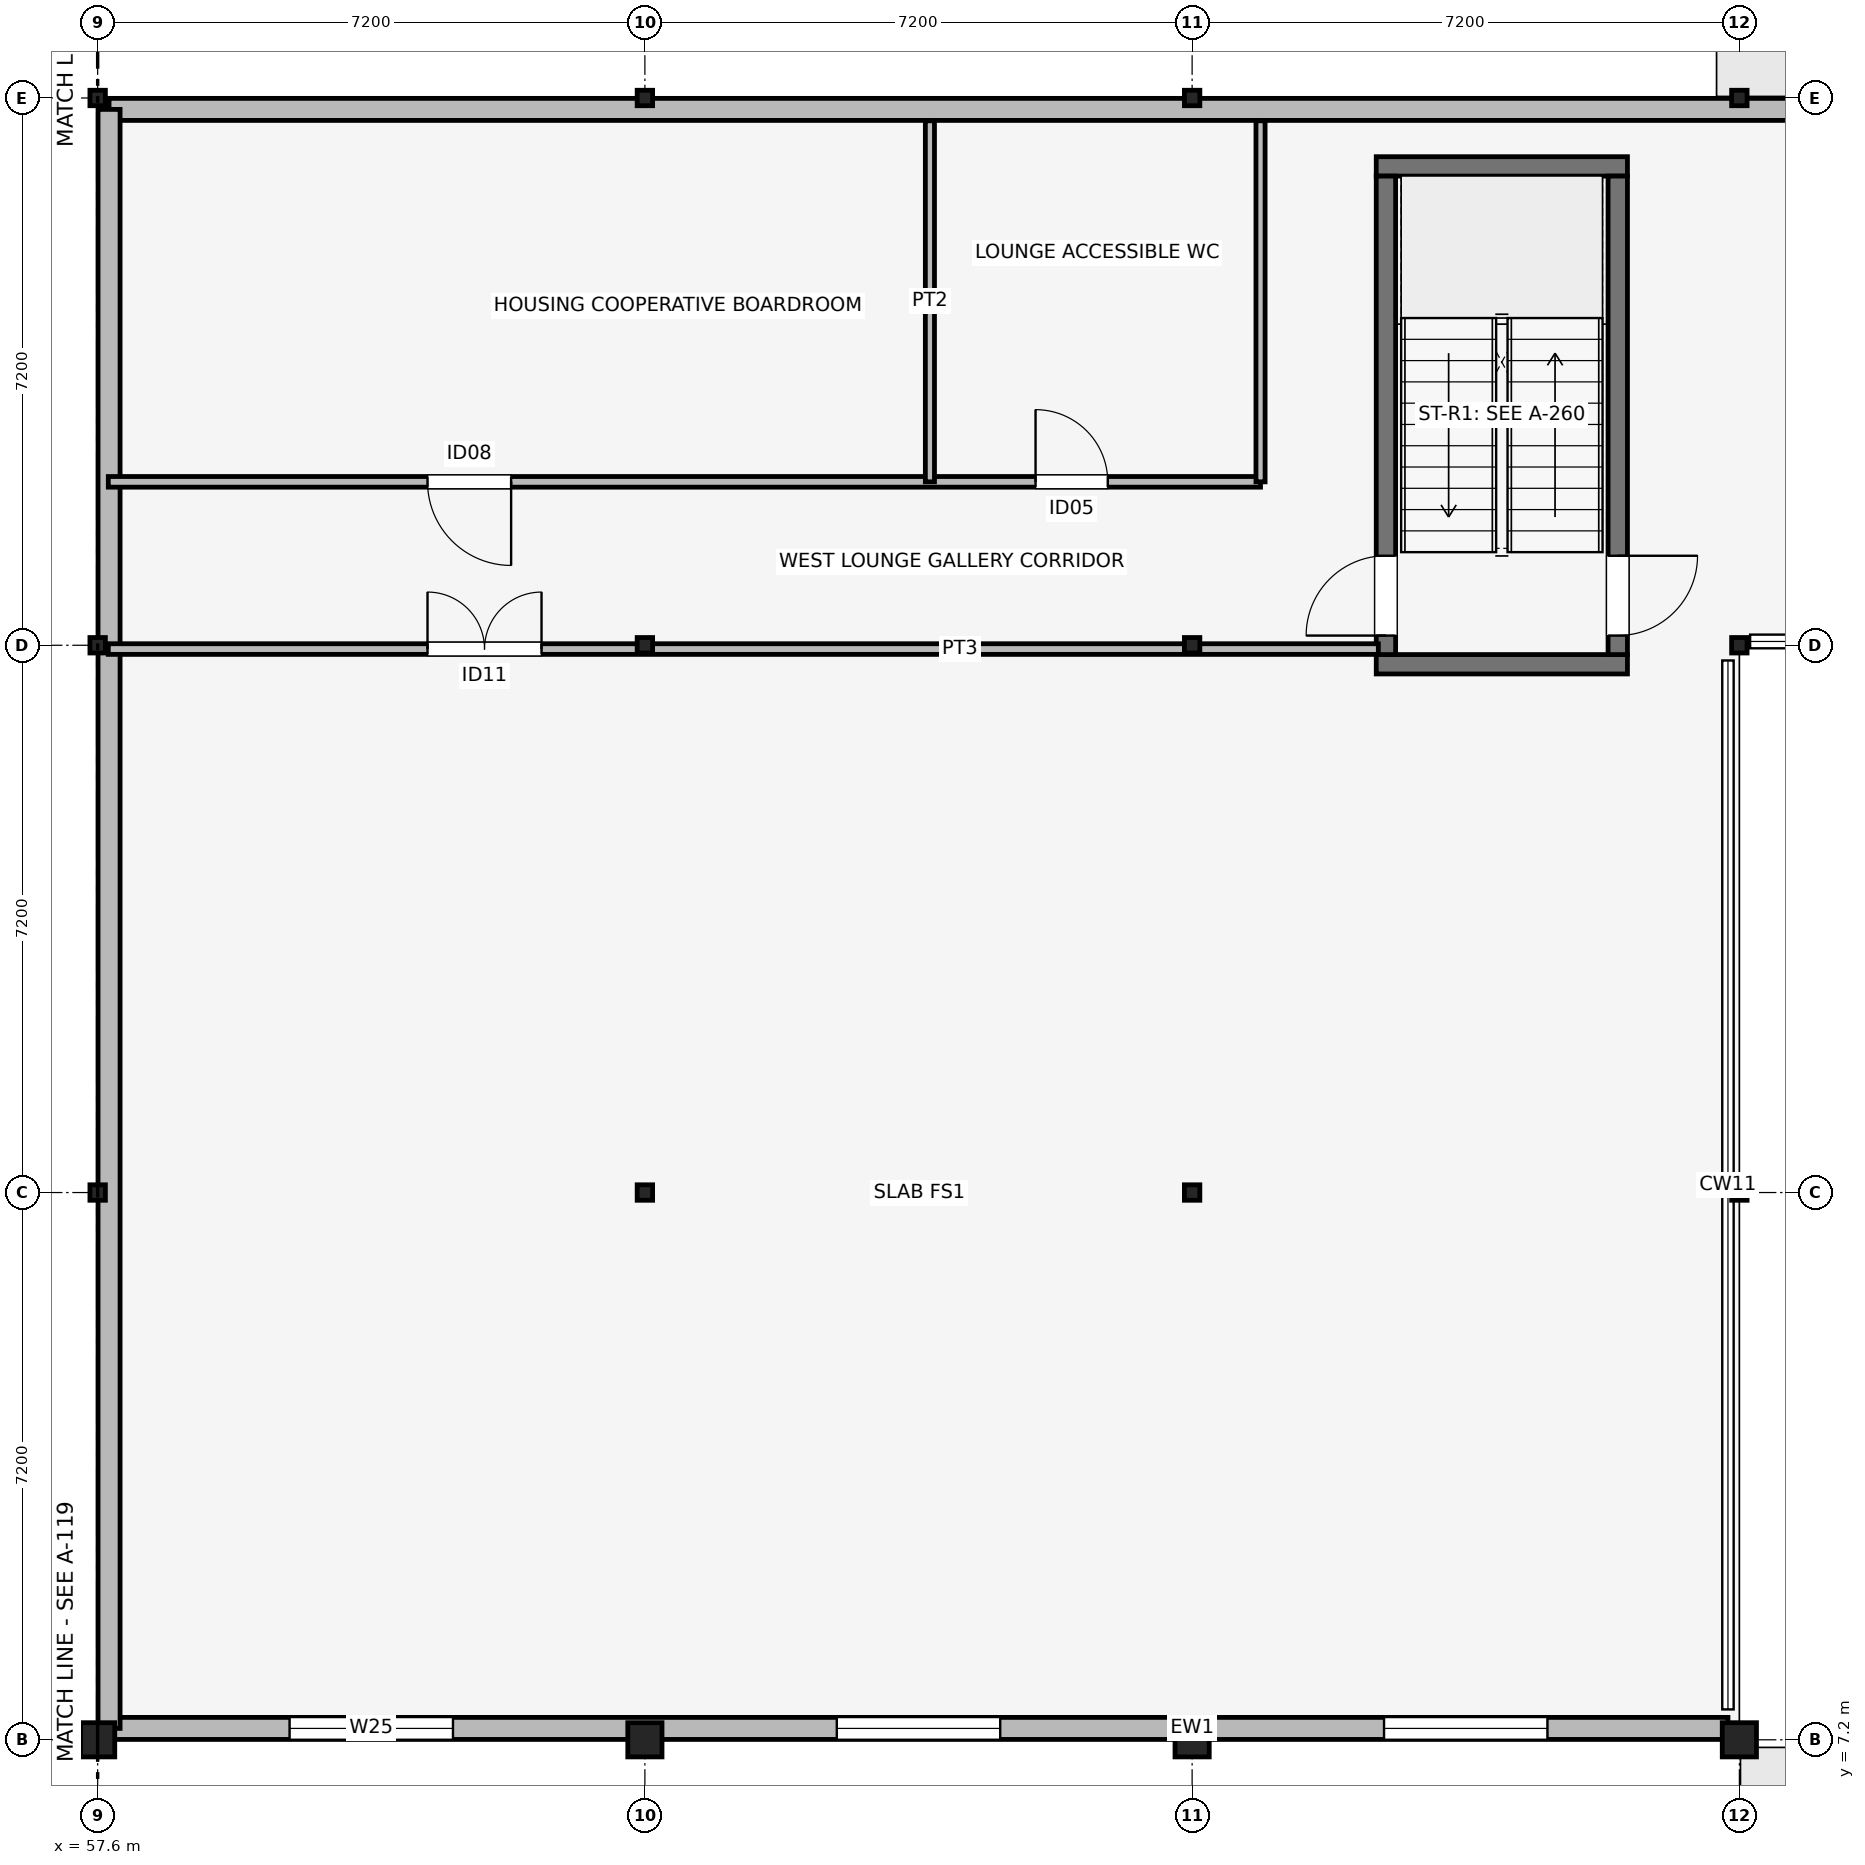
"""IFC4 building model, lengths in metres.
Left out: names, types, materials, properties, quantities, classifications, styles, units other than length and angle.
Written with IfcOpenShell. Run it as: python <this file> out.ifc"""

import sys

from ifc_helpers import new_model, si_unit, direction, frame, frame_2d, origin, origin_2d, place, context, subcontext, project, spatial, rectangle, circle, i_section, extrude, element, fill, save


model = new_model("IFC4")
c1 = context("Model", 3, precision=1e-05, world=origin(), true_north=direction((0.0, 1.0)))
c2 = subcontext(c1, "Body", "Model", "MODEL_VIEW")
j1 = project(units=[si_unit("LENGTHUNIT", "METRE"), si_unit("PLANEANGLEUNIT", "RADIAN")], contexts=[c1])
p1 = place(None, origin())
s1 = spatial("IfcSite", under=j1, at=p1, CompositionType="ELEMENT")
p2 = place(p1, origin())
s2 = spatial("IfcBuilding", under=s1, at=p2, CompositionType="ELEMENT")
p3 = place(p2, frame((0.0, 0.0, 4.5)))
s3 = spatial("IfcBuildingStorey", under=s2, at=p3, CompositionType="ELEMENT", Elevation=4.5)
p4 = place(p3, frame((57.6, 7.2, 0.0), z_axis=(0.0, 0.0, 1.0), x_axis=(1.0, 0.0, 0.0)))
e1 = element("IfcColumn", 1, at=p4, inside=s3, PredefinedType="COLUMN", context=c2, shape_type="SweptSolid", body=[
    extrude(circle(Radius=0.225, at=origin_2d()), origin(), (0.0, 0.0, 1.0), 4.2),
])
for number, where, z_axis, x_axis in (
    (2, (57.6, 14.4, 0.0), (0.0, 0.0, 1.0), (1.0, 0.0, 0.0)),
    (3, (57.6, 21.6, 0.0), (0.0, 0.0, 1.0), (1.0, 0.0, 0.0)),
    (4, (57.6, 28.8, 0.0), (0.0, 0.0, 1.0), (1.0, 0.0, 0.0)),
):
    element("IfcColumn", number, at=place(p3, frame(where, z_axis=z_axis, x_axis=x_axis)), inside=s3, PredefinedType="COLUMN", context=c2, shape_type="SweptSolid", body=[
        extrude(i_section(OverallWidth=0.203, OverallDepth=0.203, WebThickness=0.007, FlangeThickness=0.011, FilletRadius=0.01, at=origin_2d()), origin(), (0.0, 0.0, 1.0), 4.2),
    ])
p5 = place(p3, frame((64.8, 7.2, 0.0), z_axis=(0.0, 0.0, 1.0), x_axis=(1.0, 0.0, 0.0)))
e5 = element("IfcColumn", 5, at=p5, inside=s3, PredefinedType="COLUMN", context=c2, shape_type="SweptSolid", body=[
    extrude(circle(Radius=0.225, at=origin_2d()), origin(), (0.0, 0.0, 1.0), 4.2),
])
for number, where, z_axis, x_axis in (
    (6, (64.8, 14.4, 0.0), (0.0, 0.0, 1.0), (1.0, 0.0, 0.0)),
    (7, (64.8, 21.6, 0.0), (0.0, 0.0, 1.0), (1.0, 0.0, 0.0)),
    (8, (64.8, 28.8, 0.0), (0.0, 0.0, 1.0), (1.0, 0.0, 0.0)),
):
    element("IfcColumn", number, at=place(p3, frame(where, z_axis=z_axis, x_axis=x_axis)), inside=s3, PredefinedType="COLUMN", context=c2, shape_type="SweptSolid", body=[
        extrude(i_section(OverallWidth=0.203, OverallDepth=0.203, WebThickness=0.007, FlangeThickness=0.011, FilletRadius=0.01, at=origin_2d()), origin(), (0.0, 0.0, 1.0), 4.2),
    ])
p6 = place(p3, frame((72.0, 7.2, 0.0), z_axis=(0.0, 0.0, 1.0), x_axis=(1.0, 0.0, 0.0)))
e9 = element("IfcColumn", 9, at=p6, inside=s3, PredefinedType="COLUMN", context=c2, shape_type="SweptSolid", body=[
    extrude(circle(Radius=0.225, at=origin_2d()), origin(), (0.0, 0.0, 1.0), 4.2),
])
for number, where, z_axis, x_axis in (
    (10, (72.0, 14.4, 0.0), (0.0, 0.0, 1.0), (1.0, 0.0, 0.0)),
    (11, (72.0, 21.6, 0.0), (0.0, 0.0, 1.0), (1.0, 0.0, 0.0)),
    (12, (72.0, 28.8, 0.0), (0.0, 0.0, 1.0), (1.0, 0.0, 0.0)),
):
    element("IfcColumn", number, at=place(p3, frame(where, z_axis=z_axis, x_axis=x_axis)), inside=s3, PredefinedType="COLUMN", context=c2, shape_type="SweptSolid", body=[
        extrude(i_section(OverallWidth=0.203, OverallDepth=0.203, WebThickness=0.007, FlangeThickness=0.011, FilletRadius=0.01, at=origin_2d()), origin(), (0.0, 0.0, 1.0), 4.2),
    ])
p7 = place(p3, frame((79.2, 7.2, 0.0), z_axis=(0.0, 0.0, 1.0), x_axis=(1.0, 0.0, 0.0)))
e13 = element("IfcColumn", 13, at=p7, inside=s3, PredefinedType="COLUMN", context=c2, shape_type="SweptSolid", body=[
    extrude(circle(Radius=0.225, at=origin_2d()), origin(), (0.0, 0.0, 1.0), 4.2),
])
for number, where, z_axis, x_axis in (
    (14, (79.2, 14.4, 0.0), (0.0, 0.0, 1.0), (1.0, 0.0, 0.0)),
    (15, (79.2, 21.6, 0.0), (0.0, 0.0, 1.0), (1.0, 0.0, 0.0)),
    (16, (79.2, 28.8, 0.0), (0.0, 0.0, 1.0), (1.0, 0.0, 0.0)),
):
    element("IfcColumn", number, at=place(p3, frame(where, z_axis=z_axis, x_axis=x_axis)), inside=s3, PredefinedType="COLUMN", context=c2, shape_type="SweptSolid", body=[
        extrude(i_section(OverallWidth=0.203, OverallDepth=0.203, WebThickness=0.007, FlangeThickness=0.011, FilletRadius=0.01, at=origin_2d()), origin(), (0.0, 0.0, 1.0), 4.2),
    ])
for number, where, z_axis, x_axis in (
    (17, (74.423, 21.35, 0.0), (0.0, 0.0, 1.0), (1.0, 0.0, 0.0)),
    (18, (74.423, 27.9, 0.0), (0.0, 0.0, 1.0), (1.0, 0.0, 0.0)),
):
    element("IfcWall", number, at=place(p3, frame(where, z_axis=z_axis, x_axis=x_axis)), inside=s3, PredefinedType="SHEAR", context=c2, shape_type="SweptSolid", body=[
        extrude(rectangle(XDim=3.305, YDim=0.255, at=frame_2d((1.652, 0.0))), origin(), (0.0, 0.0, 1.0), 4.2),
    ])
p8 = place(p3, frame((74.55, 21.478, 0.0), z_axis=(0.0, 0.0, 1.0), x_axis=(0.0, 1.0, 0.0)))
e19 = element("IfcWall", 19, at=p8, inside=s3, PredefinedType="SHEAR", context=c2, shape_type="SweptSolid", body=[
    extrude(rectangle(XDim=6.295, YDim=0.255, at=frame_2d((3.147, 0.0))), origin(), (0.0, 0.0, 1.0), 4.2),
])
p9 = place(p8, frame((0.25, 0.0, 0.0)))
e20 = element("IfcOpeningElement", 20, at=p9, cuts=e19, PredefinedType="OPENING", context=c2, shape_type="SweptSolid", body=[
    extrude(rectangle(XDim=1.05, YDim=2.12, at=frame_2d((0.525, 1.06))), frame((0.0, 0.137, 0.0), z_axis=(0.0, -1.0, 0.0), x_axis=(1.0, 0.0, 0.0)), (0.0, 0.0, 1.0), 0.275),
])
p10 = place(p3, frame((77.6, 21.478, 0.0), z_axis=(0.0, 0.0, 1.0), x_axis=(0.0, 1.0, 0.0)))
e21 = element("IfcWall", 21, at=p10, inside=s3, PredefinedType="SHEAR", context=c2, shape_type="SweptSolid", body=[
    extrude(rectangle(XDim=6.295, YDim=0.255, at=frame_2d((3.147, 0.0))), origin(), (0.0, 0.0, 1.0), 4.2),
])
p11 = place(p10, frame((1.3, 0.0, 0.0), z_axis=(0.0, 0.0, 1.0), x_axis=(-1.0, 0.0, 0.0)))
e22 = element("IfcOpeningElement", 22, at=p11, cuts=e21, PredefinedType="OPENING", context=c2, shape_type="SweptSolid", body=[
    extrude(rectangle(XDim=1.05, YDim=2.12, at=frame_2d((0.525, 1.06))), frame((0.0, 0.137, 0.0), z_axis=(0.0, -1.0, 0.0), x_axis=(1.0, 0.0, 0.0)), (0.0, 0.0, 1.0), 0.275),
])
p12 = place(p3, frame((57.75, 7.35, 0.0), z_axis=(0.0, 0.0, 1.0), x_axis=(1.0, 0.0, 0.0)))
e23 = element("IfcWall", 23, at=p12, inside=s3, PredefinedType="SOLIDWALL", context=c2, shape_type="SweptSolid", body=[
    extrude(rectangle(XDim=21.3, YDim=0.29, at=frame_2d((10.65, 0.0))), origin(), (0.0, 0.0, 1.0), 2.74),
])
p13 = place(p12, frame((2.375, 0.0, 0.48)))
e24 = element("IfcOpeningElement", 24, at=p13, cuts=e23, PredefinedType="OPENING", context=c2, shape_type="SweptSolid", body=[
    extrude(rectangle(XDim=2.15, YDim=2.15, at=frame_2d((1.075, 1.075))), frame((0.0, 0.155, 0.0), z_axis=(0.0, -1.0, 0.0), x_axis=(1.0, 0.0, 0.0)), (0.0, 0.0, 1.0), 0.31),
])
p14 = place(p12, frame((9.575, 0.0, 0.48)))
e25 = element("IfcOpeningElement", 25, at=p14, cuts=e23, PredefinedType="OPENING", context=c2, shape_type="SweptSolid", body=[
    extrude(rectangle(XDim=2.15, YDim=2.15, at=frame_2d((1.075, 1.075))), frame((0.0, 0.155, 0.0), z_axis=(0.0, -1.0, 0.0), x_axis=(1.0, 0.0, 0.0)), (0.0, 0.0, 1.0), 0.31),
])
p15 = place(p12, frame((16.775, 0.0, 0.48)))
e26 = element("IfcOpeningElement", 26, at=p15, cuts=e23, PredefinedType="OPENING", context=c2, shape_type="SweptSolid", body=[
    extrude(rectangle(XDim=2.15, YDim=2.15, at=frame_2d((1.075, 1.075))), frame((0.0, 0.155, 0.0), z_axis=(0.0, -1.0, 0.0), x_axis=(1.0, 0.0, 0.0)), (0.0, 0.0, 1.0), 0.31),
])
p16 = place(p3, frame((57.75, 28.65, 0.0), z_axis=(0.0, 0.0, 1.0), x_axis=(1.0, 0.0, 0.0)))
e27 = element("IfcWall", 27, at=p16, inside=s3, PredefinedType="SOLIDWALL", context=c2, shape_type="SweptSolid", body=[
    extrude(rectangle(XDim=50.1, YDim=0.29, at=frame_2d((25.05, 0.0))), origin(), (0.0, 0.0, 1.0), 3.253),
])
p17 = place(p3, frame((57.75, 7.35, 0.0), z_axis=(0.0, 0.0, 1.0), x_axis=(0.0, 1.0, 0.0)))
e28 = element("IfcWall", 28, at=p17, inside=s3, PredefinedType="SOLIDWALL", context=c2, shape_type="SweptSolid", body=[
    extrude(rectangle(XDim=21.3, YDim=0.29, at=frame_2d((10.65, 0.0))), origin(), (0.0, 0.0, 1.0), 2.74),
])
p18 = place(p3, frame((57.74, 21.55, 0.0), z_axis=(0.0, 0.0, 1.0), x_axis=(1.0, 0.0, 0.0)))
e29 = element("IfcWall", 29, at=p18, inside=s3, PredefinedType="PARTITIONING", context=c2, shape_type="SweptSolid", body=[
    extrude(rectangle(XDim=16.71, YDim=0.14, at=frame_2d((8.355, 0.0))), origin(), (0.0, 0.0, 1.0), 3.2),
])
p19 = place(p18, frame((4.2, 0.0, 0.0)))
e30 = element("IfcOpeningElement", 30, at=p19, cuts=e29, PredefinedType="OPENING", context=c2, shape_type="SweptSolid", body=[
    extrude(rectangle(XDim=1.5, YDim=2.28, at=frame_2d((0.75, 1.14))), frame((0.0, 0.08, 0.0), z_axis=(0.0, -1.0, 0.0), x_axis=(1.0, 0.0, 0.0)), (0.0, 0.0, 1.0), 0.16),
])
p20 = place(p3, frame((57.74, 23.75, 0.0), z_axis=(0.0, 0.0, 1.0), x_axis=(1.0, 0.0, 0.0)))
e31 = element("IfcWall", 31, at=p20, inside=s3, PredefinedType="PARTITIONING", context=c2, shape_type="SweptSolid", body=[
    extrude(rectangle(XDim=15.16, YDim=0.14, at=frame_2d((7.58, 0.0))), origin(), (0.0, 0.0, 1.0), 3.2),
])
p21 = place(p20, frame((5.3, 0.0, 0.0), z_axis=(0.0, 0.0, 1.0), x_axis=(-1.0, 0.0, 0.0)))
e32 = element("IfcOpeningElement", 32, at=p21, cuts=e31, PredefinedType="OPENING", context=c2, shape_type="SweptSolid", body=[
    extrude(rectangle(XDim=1.1, YDim=2.15, at=frame_2d((0.55, 1.075))), frame((0.0, 0.08, 0.0), z_axis=(0.0, -1.0, 0.0), x_axis=(1.0, 0.0, 0.0)), (0.0, 0.0, 1.0), 0.16),
])
p22 = place(p20, frame((12.2, 0.0, 0.0)))
e33 = element("IfcOpeningElement", 33, at=p22, cuts=e31, PredefinedType="OPENING", context=c2, shape_type="SweptSolid", body=[
    extrude(rectangle(XDim=0.95, YDim=2.12, at=frame_2d((0.475, 1.06))), frame((0.0, 0.08, 0.0), z_axis=(0.0, -1.0, 0.0), x_axis=(1.0, 0.0, 0.0)), (0.0, 0.0, 1.0), 0.16),
])
for number, where, z_axis, x_axis in (
    (34, (68.55, 23.75, 0.0), (0.0, 0.0, 1.0), (0.0, 1.0, 0.0)),
    (35, (72.9, 23.75, 0.0), (0.0, 0.0, 1.0), (0.0, 1.0, 0.0)),
):
    element("IfcWall", number, at=place(p3, frame(where, z_axis=z_axis, x_axis=x_axis)), inside=s3, PredefinedType="PARTITIONING", context=c2, shape_type="SweptSolid", body=[
        extrude(rectangle(XDim=4.75, YDim=0.12, at=frame_2d((2.375, 0.0))), origin(), (0.0, 0.0, 1.0), 3.2),
    ])
p23 = place(p13, origin())
e36 = element("IfcWindow", 36, at=p23, inside=s3, PartitioningType="SINGLE_PANEL", PredefinedType="WINDOW", context=c2, shape_type="SweptSolid", body=[
    extrude(rectangle(XDim=2.15, YDim=2.15, at=frame_2d((1.075, 1.075))), frame((0.0, 0.03, 0.0), z_axis=(0.0, -1.0, 0.0), x_axis=(1.0, 0.0, 0.0)), (0.0, 0.0, 1.0), 0.06),
])
fill(e24, e36)
p24 = place(p14, origin())
e37 = element("IfcWindow", 37, at=p24, inside=s3, PartitioningType="SINGLE_PANEL", PredefinedType="WINDOW", context=c2, shape_type="SweptSolid", body=[
    extrude(rectangle(XDim=2.15, YDim=2.15, at=frame_2d((1.075, 1.075))), frame((0.0, 0.03, 0.0), z_axis=(0.0, -1.0, 0.0), x_axis=(1.0, 0.0, 0.0)), (0.0, 0.0, 1.0), 0.06),
])
fill(e25, e37)
p25 = place(p15, origin())
e38 = element("IfcWindow", 38, at=p25, inside=s3, PartitioningType="SINGLE_PANEL", PredefinedType="WINDOW", context=c2, shape_type="SweptSolid", body=[
    extrude(rectangle(XDim=2.15, YDim=2.15, at=frame_2d((1.075, 1.075))), frame((0.0, 0.03, 0.0), z_axis=(0.0, -1.0, 0.0), x_axis=(1.0, 0.0, 0.0)), (0.0, 0.0, 1.0), 0.06),
])
fill(e26, e38)
p26 = place(p19, origin())
e39 = element("IfcDoor", 39, at=p26, inside=s3, OperationType="DOUBLE_DOOR_SINGLE_SWING", PredefinedType="DOOR", context=c2, shape_type="SweptSolid", body=[
    extrude(rectangle(XDim=1.5, YDim=2.28, at=frame_2d((0.75, 1.14))), frame((0.0, 0.025, 0.0), z_axis=(0.0, -1.0, 0.0), x_axis=(1.0, 0.0, 0.0)), (0.0, 0.0, 1.0), 0.05),
])
fill(e30, e39)
p27 = place(p21, origin())
e40 = element("IfcDoor", 40, at=p27, inside=s3, OperationType="SINGLE_SWING_RIGHT", PredefinedType="DOOR", context=c2, shape_type="SweptSolid", body=[
    extrude(rectangle(XDim=1.1, YDim=2.15, at=frame_2d((0.55, 1.075))), frame((0.0, 0.025, 0.0), z_axis=(0.0, -1.0, 0.0), x_axis=(1.0, 0.0, 0.0)), (0.0, 0.0, 1.0), 0.05),
])
fill(e32, e40)
p28 = place(p22, origin())
e41 = element("IfcDoor", 41, at=p28, inside=s3, OperationType="SINGLE_SWING_LEFT", PredefinedType="DOOR", context=c2, shape_type="SweptSolid", body=[
    extrude(rectangle(XDim=0.95, YDim=2.12, at=frame_2d((0.475, 1.06))), frame((0.0, 0.025, 0.0), z_axis=(0.0, -1.0, 0.0), x_axis=(1.0, 0.0, 0.0)), (0.0, 0.0, 1.0), 0.05),
])
fill(e33, e41)
p29 = place(p9, origin())
e42 = element("IfcDoor", 42, at=p29, inside=s3, OperationType="SINGLE_SWING_LEFT", PredefinedType="DOOR", context=c2, shape_type="SweptSolid", body=[
    extrude(rectangle(XDim=1.05, YDim=2.12, at=frame_2d((0.525, 1.06))), frame((0.0, 0.025, 0.0), z_axis=(0.0, -1.0, 0.0), x_axis=(1.0, 0.0, 0.0)), (0.0, 0.0, 1.0), 0.05),
])
fill(e20, e42)
p30 = place(p11, origin())
e43 = element("IfcDoor", 43, at=p30, inside=s3, OperationType="SINGLE_SWING_RIGHT", PredefinedType="DOOR", context=c2, shape_type="SweptSolid", body=[
    extrude(rectangle(XDim=1.05, YDim=2.12, at=frame_2d((0.525, 1.06))), frame((0.0, 0.025, 0.0), z_axis=(0.0, -1.0, 0.0), x_axis=(1.0, 0.0, 0.0)), (0.0, 0.0, 1.0), 0.05),
])
fill(e22, e43)
save(model, sys.argv[1])
